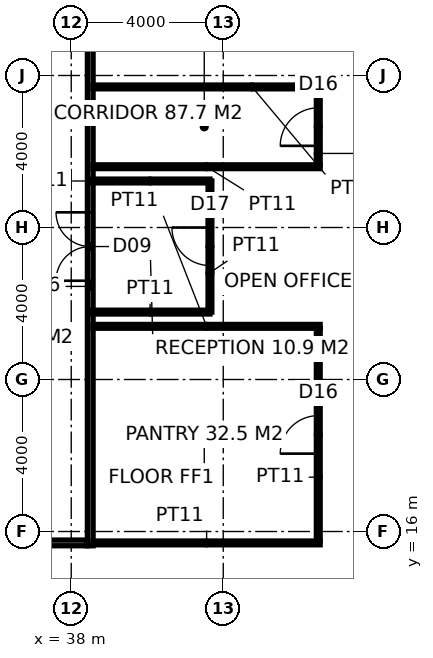
"""IFC4 building model, lengths in metres.
Left out: names, types, materials, properties, quantities, classifications, styles, units other than length and angle.
Written with IfcOpenShell. Run it as: python <this file> out.ifc"""

import sys

from ifc_helpers import new_model, si_unit, direction, frame, frame_2d, origin, place, context, subcontext, project, spatial, rectangle, extrude, element, fill, save


model = new_model("IFC4")
c1 = context("Model", 3, precision=1e-05, world=origin(), true_north=direction((0.0, 1.0)))
c2 = subcontext(c1, "Body", "Model", "MODEL_VIEW")
j1 = project(units=[si_unit("LENGTHUNIT", "METRE"), si_unit("PLANEANGLEUNIT", "RADIAN")], contexts=[c1])
p1 = place(None, origin())
s1 = spatial("IfcSite", under=j1, at=p1, CompositionType="ELEMENT")
p2 = place(p1, origin())
s2 = spatial("IfcBuilding", under=s1, at=p2, CompositionType="ELEMENT")
p3 = place(p2, frame((0.0, 0.0, 230.2)))
s3 = spatial("IfcBuildingStorey", under=s2, at=p3, CompositionType="ELEMENT", Elevation=230.2)
p4 = place(p3, frame((38.5, 15.625, 0.0), z_axis=(0.0, 0.0, 1.0), x_axis=(0.0, 1.0, 0.0)))
e1 = element("IfcWall", 1, at=p4, inside=s3, PredefinedType="PARTITIONING", context=c2, shape_type="SweptSolid", body=[
    extrude(rectangle(XDim=22.75, YDim=0.15, at=frame_2d((11.375, 0.0))), origin(), (0.0, 0.0, 1.0), 3.85),
])
p5 = place(p4, frame((6.974, 0.0, 0.0)))
e2 = element("IfcOpeningElement", 2, at=p5, cuts=e1, PredefinedType="OPENING", context=c2, shape_type="SweptSolid", body=[
    extrude(rectangle(XDim=1.8, YDim=2.4, at=frame_2d((0.9, 1.2))), frame((0.0, 0.085, 0.0), z_axis=(0.0, -1.0, 0.0), x_axis=(1.0, 0.0, 0.0)), (0.0, 0.0, 1.0), 0.17),
])
p6 = place(p4, frame((18.226, 0.0, 0.0)))
e3 = element("IfcOpeningElement", 3, at=p6, cuts=e1, PredefinedType="OPENING", context=c2, shape_type="SweptSolid", body=[
    extrude(rectangle(XDim=1.8, YDim=2.4, at=frame_2d((0.9, 1.2))), frame((0.0, 0.085, 0.0), z_axis=(0.0, -1.0, 0.0), x_axis=(1.0, 0.0, 0.0)), (0.0, 0.0, 1.0), 0.17),
])
p7 = place(p3, frame((15.775, 15.7, 0.0), z_axis=(0.0, 0.0, 1.0), x_axis=(1.0, 0.0, 0.0)))
e4 = element("IfcWall", 4, at=p7, inside=s3, PredefinedType="PARTITIONING", context=c2, shape_type="SweptSolid", body=[
    extrude(rectangle(XDim=22.65, YDim=0.15, at=frame_2d((11.325, 0.0))), origin(), (0.0, 0.0, 1.0), 3.85),
])
for number, where, z_axis, x_axis in (
    (5, (38.575, 15.7, 0.0), (0.0, 0.0, 1.0), (1.0, 0.0, 0.0)),
    (6, (38.575, 21.399, 0.0), (0.0, 0.0, 1.0), (1.0, 0.0, 0.0)),
    (7, (38.575, 25.599, 0.0), (0.0, 0.0, 1.0), (1.0, 0.0, 0.0)),
    (8, (38.575, 27.699, 0.0), (0.0, 0.0, 1.0), (1.0, 0.0, 0.0)),
):
    element("IfcWall", number, at=place(p3, frame(where, z_axis=z_axis, x_axis=x_axis)), inside=s3, PredefinedType="PARTITIONING", context=c2, shape_type="SweptSolid", body=[
        extrude(rectangle(XDim=5.975, YDim=0.1, at=frame_2d((2.988, 0.0))), origin(), (0.0, 0.0, 1.0), 3.85),
    ])
p8 = place(p3, frame((44.5, 15.75, 0.0), z_axis=(0.0, 0.0, 1.0), x_axis=(0.0, 1.0, 0.0)))
e9 = element("IfcWall", 9, at=p8, inside=s3, PredefinedType="PARTITIONING", context=c2, shape_type="SweptSolid", body=[
    extrude(rectangle(XDim=5.599, YDim=0.1, at=frame_2d((2.8, 0.0))), origin(), (0.0, 0.0, 1.0), 3.85),
])
p9 = place(p8, frame((2.3, 0.0, 0.0)))
e10 = element("IfcOpeningElement", 10, at=p9, cuts=e9, PredefinedType="OPENING", context=c2, shape_type="SweptSolid", body=[
    extrude(rectangle(XDim=1.0, YDim=2.2, at=frame_2d((0.5, 1.1))), frame((0.0, 0.06, 0.0), z_axis=(0.0, -1.0, 0.0), x_axis=(1.0, 0.0, 0.0)), (0.0, 0.0, 1.0), 0.12),
])
p10 = place(p3, frame((44.5, 25.649, 0.0), z_axis=(0.0, 0.0, 1.0), x_axis=(0.0, 1.0, 0.0)))
e11 = element("IfcWall", 11, at=p10, inside=s3, PredefinedType="PARTITIONING", context=c2, shape_type="SweptSolid", body=[
    extrude(rectangle(XDim=2.0, YDim=0.1, at=frame_2d((1.0, 0.0))), origin(), (0.0, 0.0, 1.0), 3.85),
])
p11 = place(p10, frame((0.5, 0.0, 0.0)))
e12 = element("IfcOpeningElement", 12, at=p11, cuts=e11, PredefinedType="OPENING", context=c2, shape_type="SweptSolid", body=[
    extrude(rectangle(XDim=1.0, YDim=2.2, at=frame_2d((0.5, 1.1))), frame((0.0, 0.06, 0.0), z_axis=(0.0, -1.0, 0.0), x_axis=(1.0, 0.0, 0.0)), (0.0, 0.0, 1.0), 0.12),
])
p12 = place(p3, frame((38.5, 21.774, 0.0), z_axis=(0.0, 0.0, 1.0), x_axis=(1.0, 0.0, 0.0)))
e13 = element("IfcWall", 13, at=p12, inside=s3, PredefinedType="PARTITIONING", context=c2, shape_type="SweptSolid", body=[
    extrude(rectangle(XDim=3.15, YDim=0.1, at=frame_2d((1.575, 0.0))), origin(), (0.0, 0.0, 1.0), 3.85),
])
p13 = place(p3, frame((41.65, 21.774, 0.0), z_axis=(0.0, 0.0, 1.0), x_axis=(0.0, 1.0, 0.0)))
e14 = element("IfcWall", 14, at=p13, inside=s3, PredefinedType="PARTITIONING", context=c2, shape_type="SweptSolid", body=[
    extrude(rectangle(XDim=3.45, YDim=0.1, at=frame_2d((1.725, 0.0))), origin(), (0.0, 0.0, 1.0), 3.85),
])
p14 = place(p13, frame((1.225, 0.0, 0.0)))
e15 = element("IfcOpeningElement", 15, at=p14, cuts=e14, PredefinedType="OPENING", context=c2, shape_type="SweptSolid", body=[
    extrude(rectangle(XDim=1.0, YDim=2.2, at=frame_2d((0.5, 1.1))), frame((0.0, 0.06, 0.0), z_axis=(0.0, -1.0, 0.0), x_axis=(1.0, 0.0, 0.0)), (0.0, 0.0, 1.0), 0.12),
])
p15 = place(p3, frame((41.65, 25.224, 0.0), z_axis=(0.0, 0.0, 1.0), x_axis=(-1.0, 0.0, 0.0)))
e16 = element("IfcWall", 16, at=p15, inside=s3, PredefinedType="PARTITIONING", context=c2, shape_type="SweptSolid", body=[
    extrude(rectangle(XDim=3.15, YDim=0.1, at=frame_2d((1.575, 0.0))), origin(), (0.0, 0.0, 1.0), 3.85),
])
p16 = place(p5, origin())
e17 = element("IfcDoor", 17, at=p16, inside=s3, OperationType="DOUBLE_DOOR_DOUBLE_SWING", PredefinedType="DOOR", context=c2, shape_type="SweptSolid", body=[
    extrude(rectangle(XDim=1.8, YDim=2.4, at=frame_2d((0.9, 1.2))), frame((0.0, 0.025, 0.0), z_axis=(0.0, -1.0, 0.0), x_axis=(1.0, 0.0, 0.0)), (0.0, 0.0, 1.0), 0.05),
])
fill(e2, e17)
p17 = place(p9, origin())
e18 = element("IfcDoor", 18, at=p17, inside=s3, OperationType="SINGLE_SWING_LEFT", PredefinedType="DOOR", context=c2, shape_type="SweptSolid", body=[
    extrude(rectangle(XDim=1.0, YDim=2.2, at=frame_2d((0.5, 1.1))), frame((0.0, 0.025, 0.0), z_axis=(0.0, -1.0, 0.0), x_axis=(1.0, 0.0, 0.0)), (0.0, 0.0, 1.0), 0.05),
])
fill(e10, e18)
p18 = place(p11, origin())
e19 = element("IfcDoor", 19, at=p18, inside=s3, OperationType="SINGLE_SWING_LEFT", PredefinedType="DOOR", context=c2, shape_type="SweptSolid", body=[
    extrude(rectangle(XDim=1.0, YDim=2.2, at=frame_2d((0.5, 1.1))), frame((0.0, 0.025, 0.0), z_axis=(0.0, -1.0, 0.0), x_axis=(1.0, 0.0, 0.0)), (0.0, 0.0, 1.0), 0.05),
])
fill(e12, e19)
p19 = place(p14, origin())
e20 = element("IfcDoor", 20, at=p19, inside=s3, OperationType="SINGLE_SWING_RIGHT", PredefinedType="DOOR", context=c2, shape_type="SweptSolid", body=[
    extrude(rectangle(XDim=1.0, YDim=2.2, at=frame_2d((0.5, 1.1))), frame((0.0, 0.025, 0.0), z_axis=(0.0, -1.0, 0.0), x_axis=(1.0, 0.0, 0.0)), (0.0, 0.0, 1.0), 0.05),
])
fill(e15, e20)
save(model, sys.argv[1])
